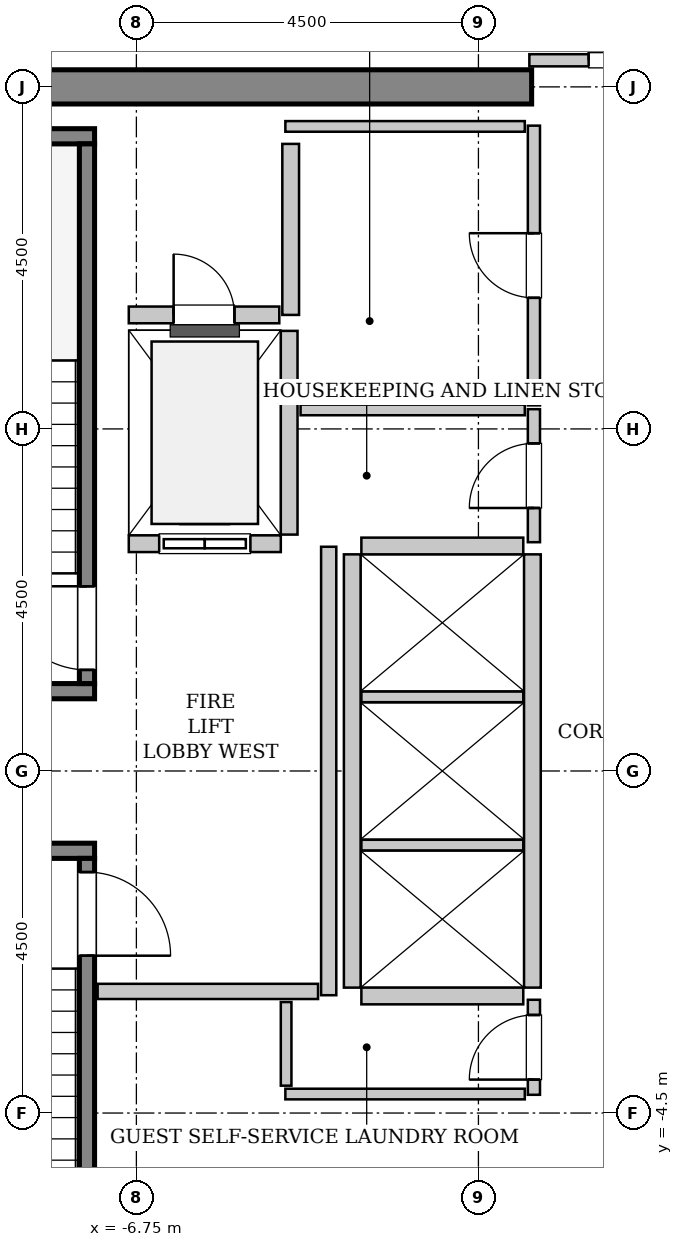
"""IFC4 building model, lengths in metres.
Left out: names, types, materials, properties, quantities, classifications, styles, units other than length and angle.
Written with IfcOpenShell. Run it as: python <this file> out.ifc"""

import sys

from ifc_helpers import new_model, si_unit, direction, frame, frame_2d, origin, place, context, subcontext, project, spatial, rectangle, extrude, source, transform, mapped, element, fill, save


model = new_model("IFC4")
c1 = context("Model", 3, precision=1e-05, world=origin(), true_north=direction((0.0, 1.0)))
c2 = subcontext(c1, "Body", "Model", "MODEL_VIEW")
j1 = project(units=[si_unit("LENGTHUNIT", "METRE"), si_unit("PLANEANGLEUNIT", "RADIAN")], contexts=[c1])
p1 = place(None, origin())
s1 = spatial("IfcSite", under=j1, at=p1, CompositionType="ELEMENT")
p2 = place(p1, origin())
s2 = spatial("IfcBuilding", under=s1, at=p2, CompositionType="ELEMENT")
p3 = place(p2, frame((0.0, 0.0, 248.4)))
s3 = spatial("IfcBuildingStorey", under=s2, at=p3, CompositionType="ELEMENT", Elevation=248.4)
m1 = source(origin(), c2, "Body", "SweptSolid", [
    extrude(rectangle(XDim=9.925, YDim=0.45, at=frame_2d((4.962, 0.0))), origin(), (0.0, 0.0, 1.0), 3.8),
])
p4 = place(p3, frame((-11.475, 9.0, 0.0), z_axis=(0.0, 0.0, 1.0), x_axis=(1.0, 0.0, 0.0)))
e1 = element("IfcWall", 1, at=p4, inside=s3, PredefinedType="SHEAR", context=c2, shape_type="MappedRepresentation", body=[
    mapped(m1, transform((0.0, 0.0, 0.0), x_axis=(1.0, 0.0, 0.0), y_axis=(0.0, 1.0, 0.0), z_axis=(0.0, 0.0, 1.0), scale=1.0)),
])
m2 = source(origin(), c2, "Body", "SweptSolid", [
    extrude(rectangle(XDim=3.4, YDim=0.2, at=frame_2d((1.7, 0.0))), origin(), (0.0, 0.0, 1.0), 3.8),
])
p5 = place(p3, frame((-7.3, 1.05, 0.0), z_axis=(0.0, 0.0, 1.0), x_axis=(-1.0, 0.0, 0.0)))
e2 = element("IfcWall", 2, at=p5, inside=s3, PredefinedType="SOLIDWALL", context=c2, shape_type="MappedRepresentation", body=[
    mapped(m2, transform((0.0, 0.0, 0.0), x_axis=(1.0, 0.0, 0.0), y_axis=(0.0, 1.0, 0.0), z_axis=(0.0, 0.0, 1.0), scale=1.0)),
])
m3 = source(origin(), c2, "Body", "SweptSolid", [
    extrude(rectangle(XDim=3.73, YDim=0.2, at=frame_2d((1.865, 0.0))), origin(), (0.0, 0.0, 1.0), 3.8),
])
p6 = place(p3, frame((-7.3, 8.35, 0.0), z_axis=(0.0, 0.0, 1.0), x_axis=(-1.0, 0.0, 0.0)))
e3 = element("IfcWall", 3, at=p6, inside=s3, PredefinedType="SOLIDWALL", context=c2, shape_type="MappedRepresentation", body=[
    mapped(m3, transform((0.0, 0.0, 0.0), x_axis=(1.0, 0.0, 0.0), y_axis=(0.0, 1.0, 0.0), z_axis=(0.0, 0.0, 1.0), scale=1.0)),
])
m4 = source(origin(), c2, "Body", "SweptSolid", [
    extrude(rectangle(XDim=7.1, YDim=0.2, at=frame_2d((3.55, 0.0))), origin(), (0.0, 0.0, 1.0), 3.8),
])
p7 = place(p3, frame((-7.4, 1.15, 0.0), z_axis=(0.0, 0.0, 1.0), x_axis=(0.0, 1.0, 0.0)))
e4 = element("IfcWall", 4, at=p7, inside=s3, PredefinedType="SOLIDWALL", context=c2, shape_type="MappedRepresentation", body=[
    mapped(m4, transform((0.0, 0.0, 0.0), x_axis=(1.0, 0.0, 0.0), y_axis=(0.0, 1.0, 0.0), z_axis=(0.0, 0.0, 1.0), scale=1.0)),
])
p8 = place(p7, frame((0.18, 0.0, 0.0)))
e5 = element("IfcOpeningElement", 5, at=p8, cuts=e4, PredefinedType="OPENING", context=c2, shape_type="SweptSolid", body=[
    extrude(rectangle(XDim=1.1, YDim=2.15, at=frame_2d((0.55, 1.075))), frame((0.0, 0.11, 0.0), z_axis=(0.0, -1.0, 0.0), x_axis=(1.0, 0.0, 0.0)), (0.0, 0.0, 1.0), 0.22),
])
p9 = place(p3, frame((-10.7, -1.05, 0.0), z_axis=(0.0, 0.0, 1.0), x_axis=(1.0, 0.0, 0.0)))
e6 = element("IfcWall", 6, at=p9, inside=s3, PredefinedType="SOLIDWALL", context=c2, shape_type="MappedRepresentation", body=[
    mapped(m2, transform((0.0, 0.0, 0.0), x_axis=(1.0, 0.0, 0.0), y_axis=(0.0, 1.0, 0.0), z_axis=(0.0, 0.0, 1.0), scale=1.0)),
])
p10 = place(p3, frame((-7.4, -1.15, 0.0), z_axis=(0.0, 0.0, 1.0), x_axis=(0.0, -1.0, 0.0)))
e7 = element("IfcWall", 7, at=p10, inside=s3, PredefinedType="SOLIDWALL", context=c2, shape_type="MappedRepresentation", body=[
    mapped(m4, transform((0.0, 0.0, 0.0), x_axis=(1.0, 0.0, 0.0), y_axis=(0.0, 1.0, 0.0), z_axis=(0.0, 0.0, 1.0), scale=1.0)),
])
p11 = place(p10, frame((0.18, 0.0, 0.0)))
e8 = element("IfcOpeningElement", 8, at=p11, cuts=e7, PredefinedType="OPENING", context=c2, shape_type="SweptSolid", body=[
    extrude(rectangle(XDim=1.1, YDim=2.15, at=frame_2d((0.55, 1.075))), frame((0.0, 0.11, 0.0), z_axis=(0.0, -1.0, 0.0), x_axis=(1.0, 0.0, 0.0)), (0.0, 0.0, 1.0), 0.22),
])
m5 = source(origin(), c2, "Body", "SweptSolid", [
    extrude(rectangle(XDim=2.0, YDim=0.22, at=frame_2d((1.0, 0.0))), origin(), (0.0, 0.0, 1.0), 3.535),
])
p12 = place(p3, frame((-6.85, 2.99, 0.0), z_axis=(0.0, 0.0, 1.0), x_axis=(1.0, 0.0, 0.0)))
e9 = element("IfcWall", 9, at=p12, inside=s3, PredefinedType="SOLIDWALL", context=c2, shape_type="MappedRepresentation", body=[
    mapped(m5, transform((0.0, 0.0, 0.0), x_axis=(1.0, 0.0, 0.0), y_axis=(0.0, 1.0, 0.0), z_axis=(0.0, 0.0, 1.0), scale=1.0)),
])
p13 = place(p12, frame((0.4, 0.0, 0.0)))
e10 = element("IfcOpeningElement", 10, at=p13, cuts=e9, PredefinedType="OPENING", context=c2, shape_type="SweptSolid", body=[
    extrude(rectangle(XDim=1.2, YDim=2.2, at=frame_2d((0.6, 1.1))), frame((0.0, 0.12, 0.0), z_axis=(0.0, -1.0, 0.0), x_axis=(1.0, 0.0, 0.0)), (0.0, 0.0, 1.0), 0.24),
])
m6 = source(origin(), c2, "Body", "SweptSolid", [
    extrude(rectangle(XDim=2.68, YDim=0.22, at=frame_2d((1.34, 0.0))), origin(), (0.0, 0.0, 1.0), 3.535),
])
p14 = place(p3, frame((-4.74, 3.11, 0.0), z_axis=(0.0, 0.0, 1.0), x_axis=(0.0, 1.0, 0.0)))
e11 = element("IfcWall", 11, at=p14, inside=s3, PredefinedType="SOLIDWALL", context=c2, shape_type="MappedRepresentation", body=[
    mapped(m6, transform((0.0, 0.0, 0.0), x_axis=(1.0, 0.0, 0.0), y_axis=(0.0, 1.0, 0.0), z_axis=(0.0, 0.0, 1.0), scale=1.0)),
])
m7 = source(origin(), c2, "Body", "SweptSolid", [
    extrude(rectangle(XDim=5.7, YDim=0.22, at=frame_2d((2.85, 0.0))), origin(), (0.0, 0.0, 1.0), 3.535),
])
for number, where, z_axis, x_axis in (
    (12, (-1.54, -2.85, 0.0), (0.0, 0.0, 1.0), (0.0, 1.0, 0.0)),
    (13, (-3.91, 2.85, 0.0), (0.0, 0.0, 1.0), (0.0, -1.0, 0.0)),
):
    element("IfcWall", number, at=place(p3, frame(where, z_axis=z_axis, x_axis=x_axis)), inside=s3, PredefinedType="SOLIDWALL", context=c2, shape_type="MappedRepresentation", body=[
        mapped(m7, transform((0.0, 0.0, 0.0), x_axis=(1.0, 0.0, 0.0), y_axis=(0.0, 1.0, 0.0), z_axis=(0.0, 0.0, 1.0), scale=1.0)),
    ])
m8 = source(origin(), c2, "Body", "SweptSolid", [
    extrude(rectangle(XDim=2.13, YDim=0.22, at=frame_2d((1.065, 0.0))), origin(), (0.0, 0.0, 1.0), 3.535),
])
p15 = place(p3, frame((-3.79, -2.96, 0.0), z_axis=(0.0, 0.0, 1.0), x_axis=(1.0, 0.0, 0.0)))
e14 = element("IfcWall", 14, at=p15, inside=s3, PredefinedType="SOLIDWALL", context=c2, shape_type="MappedRepresentation", body=[
    mapped(m8, transform((0.0, 0.0, 0.0), x_axis=(1.0, 0.0, 0.0), y_axis=(0.0, 1.0, 0.0), z_axis=(0.0, 0.0, 1.0), scale=1.0)),
])
m9 = source(origin(), c2, "Body", "SweptSolid", [
    extrude(rectangle(XDim=2.13, YDim=0.14, at=frame_2d((1.065, 0.0))), origin(), (0.0, 0.0, 1.0), 3.535),
])
for number, where, z_axis, x_axis in (
    (15, (-3.79, -0.975, 0.0), (0.0, 0.0, 1.0), (1.0, 0.0, 0.0)),
    (16, (-3.79, 0.975, 0.0), (0.0, 0.0, 1.0), (1.0, 0.0, 0.0)),
):
    element("IfcWall", number, at=place(p3, frame(where, z_axis=z_axis, x_axis=x_axis)), inside=s3, PredefinedType="PARTITIONING", context=c2, shape_type="MappedRepresentation", body=[
        mapped(m9, transform((0.0, 0.0, 0.0), x_axis=(1.0, 0.0, 0.0), y_axis=(0.0, 1.0, 0.0), z_axis=(0.0, 0.0, 1.0), scale=1.0)),
    ])
p16 = place(p3, frame((-1.66, 2.96, 0.0), z_axis=(0.0, 0.0, 1.0), x_axis=(-1.0, 0.0, 0.0)))
e17 = element("IfcWall", 17, at=p16, inside=s3, PredefinedType="SOLIDWALL", context=c2, shape_type="MappedRepresentation", body=[
    mapped(m8, transform((0.0, 0.0, 0.0), x_axis=(1.0, 0.0, 0.0), y_axis=(0.0, 1.0, 0.0), z_axis=(0.0, 0.0, 1.0), scale=1.0)),
])
m10 = source(origin(), c2, "Body", "SweptSolid", [
    extrude(rectangle(XDim=2.25, YDim=0.22, at=frame_2d((1.125, 0.0))), origin(), (0.0, 0.0, 1.0), 3.535),
])
p17 = place(p3, frame((-4.72, 6.0, 0.0), z_axis=(0.0, 0.0, 1.0), x_axis=(0.0, 1.0, 0.0)))
e18 = element("IfcWall", 18, at=p17, inside=s3, PredefinedType="SOLIDWALL", context=c2, shape_type="MappedRepresentation", body=[
    mapped(m10, transform((0.0, 0.0, 0.0), x_axis=(1.0, 0.0, 0.0), y_axis=(0.0, 1.0, 0.0), z_axis=(0.0, 0.0, 1.0), scale=1.0)),
])
m11 = source(origin(), c2, "Body", "SweptSolid", [
    extrude(rectangle(XDim=1.98, YDim=0.22, at=frame_2d((0.99, 0.0))), origin(), (0.0, 0.0, 1.0), 3.535),
])
p18 = place(p3, frame((-6.85, 6.0, 0.0), z_axis=(0.0, 0.0, 1.0), x_axis=(1.0, 0.0, 0.0)))
e19 = element("IfcWall", 19, at=p18, inside=s3, PredefinedType="SOLIDWALL", context=c2, shape_type="MappedRepresentation", body=[
    mapped(m11, transform((0.0, 0.0, 0.0), x_axis=(1.0, 0.0, 0.0), y_axis=(0.0, 1.0, 0.0), z_axis=(0.0, 0.0, 1.0), scale=1.0)),
])
p19 = place(p18, frame((0.59, 0.0, 0.0)))
e20 = element("IfcOpeningElement", 20, at=p19, cuts=e19, PredefinedType="OPENING", context=c2, shape_type="SweptSolid", body=[
    extrude(rectangle(XDim=0.8, YDim=2.0, at=frame_2d((0.4, 1.0))), frame((0.0, 0.12, 0.0), z_axis=(0.0, -1.0, 0.0), x_axis=(1.0, 0.0, 0.0)), (0.0, 0.0, 1.0), 0.24),
])
m12 = source(origin(), c2, "Body", "SweptSolid", [
    extrude(rectangle(XDim=5.9, YDim=0.2, at=frame_2d((2.95, 0.0))), origin(), (0.0, 0.0, 1.0), 3.535),
])
p20 = place(p3, frame((-4.22, -2.95, 0.0), z_axis=(0.0, 0.0, 1.0), x_axis=(0.0, 1.0, 0.0)))
e21 = element("IfcWall", 21, at=p20, inside=s3, PredefinedType="PARTITIONING", context=c2, shape_type="MappedRepresentation", body=[
    mapped(m12, transform((0.0, 0.0, 0.0), x_axis=(1.0, 0.0, 0.0), y_axis=(0.0, 1.0, 0.0), z_axis=(0.0, 0.0, 1.0), scale=1.0)),
])
m13 = source(origin(), c2, "Body", "SweptSolid", [
    extrude(rectangle(XDim=2.9, YDim=0.2, at=frame_2d((1.45, 0.0))), origin(), (0.0, 0.0, 1.0), 3.535),
])
p21 = place(p3, frame((-7.26, -2.9, 0.0), z_axis=(0.0, 0.0, 1.0), x_axis=(1.0, 0.0, 0.0)))
e22 = element("IfcWall", 22, at=p21, inside=s3, PredefinedType="PARTITIONING", context=c2, shape_type="MappedRepresentation", body=[
    mapped(m13, transform((0.0, 0.0, 0.0), x_axis=(1.0, 0.0, 0.0), y_axis=(0.0, 1.0, 0.0), z_axis=(0.0, 0.0, 1.0), scale=1.0)),
])
m14 = source(origin(), c2, "Body", "SweptSolid", [
    extrude(rectangle(XDim=3.16, YDim=0.16, at=frame_2d((1.58, 0.0))), origin(), (0.0, 0.0, 1.0), 2.625),
])
p22 = place(p3, frame((-1.58, 9.35, 0.0), z_axis=(0.0, 0.0, 1.0), x_axis=(1.0, 0.0, 0.0)))
e23 = element("IfcWall", 23, at=p22, inside=s3, PredefinedType="PARTITIONING", context=c2, shape_type="MappedRepresentation", body=[
    mapped(m14, transform((0.0, 0.0, 0.0), x_axis=(1.0, 0.0, 0.0), y_axis=(0.0, 1.0, 0.0), z_axis=(0.0, 0.0, 1.0), scale=1.0)),
])
p23 = place(p22, frame((0.78, 0.0, 0.0)))
e24 = element("IfcOpeningElement", 24, at=p23, cuts=e23, PredefinedType="OPENING", context=c2, shape_type="SweptSolid", body=[
    extrude(rectangle(XDim=1.6, YDim=2.3, at=frame_2d((0.8, 1.15))), frame((0.0, 0.09, 0.0), z_axis=(0.0, -1.0, 0.0), x_axis=(1.0, 0.0, 0.0)), (0.0, 0.0, 1.0), 0.18),
])
m15 = source(origin(), c2, "Body", "SweptSolid", [
    extrude(rectangle(XDim=1.75, YDim=0.16, at=frame_2d((0.875, 0.0))), origin(), (0.0, 0.0, 1.0), 3.535),
])
p24 = place(p3, frame((-1.52, 3.01, 0.0), z_axis=(0.0, 0.0, 1.0), x_axis=(0.0, 1.0, 0.0)))
e25 = element("IfcWall", 25, at=p24, inside=s3, PredefinedType="PARTITIONING", context=c2, shape_type="MappedRepresentation", body=[
    mapped(m15, transform((0.0, 0.0, 0.0), x_axis=(1.0, 0.0, 0.0), y_axis=(0.0, 1.0, 0.0), z_axis=(0.0, 0.0, 1.0), scale=1.0)),
])
p25 = place(p24, frame((0.45, 0.0, 0.0)))
e26 = element("IfcOpeningElement", 26, at=p25, cuts=e25, PredefinedType="OPENING", context=c2, shape_type="SweptSolid", body=[
    extrude(rectangle(XDim=0.85, YDim=2.1, at=frame_2d((0.425, 1.05))), frame((0.0, 0.09, 0.0), z_axis=(0.0, -1.0, 0.0), x_axis=(1.0, 0.0, 0.0)), (0.0, 0.0, 1.0), 0.18),
])
m16 = source(origin(), c2, "Body", "SweptSolid", [
    extrude(rectangle(XDim=2.95, YDim=0.14, at=frame_2d((1.475, 0.0))), origin(), (0.0, 0.0, 1.0), 3.535),
])
p26 = place(p3, frame((-4.59, 4.75, 0.0), z_axis=(0.0, 0.0, 1.0), x_axis=(1.0, 0.0, 0.0)))
e27 = element("IfcWall", 27, at=p26, inside=s3, PredefinedType="PARTITIONING", context=c2, shape_type="MappedRepresentation", body=[
    mapped(m16, transform((0.0, 0.0, 0.0), x_axis=(1.0, 0.0, 0.0), y_axis=(0.0, 1.0, 0.0), z_axis=(0.0, 0.0, 1.0), scale=1.0)),
])
m17 = source(origin(), c2, "Body", "SweptSolid", [
    extrude(rectangle(XDim=3.68, YDim=0.16, at=frame_2d((1.84, 0.0))), origin(), (0.0, 0.0, 1.0), 3.535),
])
p27 = place(p3, frame((-1.52, 4.81, 0.0), z_axis=(0.0, 0.0, 1.0), x_axis=(0.0, 1.0, 0.0)))
e28 = element("IfcWall", 28, at=p27, inside=s3, PredefinedType="PARTITIONING", context=c2, shape_type="MappedRepresentation", body=[
    mapped(m17, transform((0.0, 0.0, 0.0), x_axis=(1.0, 0.0, 0.0), y_axis=(0.0, 1.0, 0.0), z_axis=(0.0, 0.0, 1.0), scale=1.0)),
])
p28 = place(p27, frame((1.415, 0.0, 0.0)))
e29 = element("IfcOpeningElement", 29, at=p28, cuts=e28, PredefinedType="OPENING", context=c2, shape_type="SweptSolid", body=[
    extrude(rectangle(XDim=0.85, YDim=2.1, at=frame_2d((0.425, 1.05))), frame((0.0, 0.09, 0.0), z_axis=(0.0, -1.0, 0.0), x_axis=(1.0, 0.0, 0.0)), (0.0, 0.0, 1.0), 0.18),
])
m18 = source(origin(), c2, "Body", "SweptSolid", [
    extrude(rectangle(XDim=3.15, YDim=0.14, at=frame_2d((1.575, 0.0))), origin(), (0.0, 0.0, 1.0), 3.535),
])
p29 = place(p3, frame((-4.79, 8.48, 0.0), z_axis=(0.0, 0.0, 1.0), x_axis=(1.0, 0.0, 0.0)))
e30 = element("IfcWall", 30, at=p29, inside=s3, PredefinedType="PARTITIONING", context=c2, shape_type="MappedRepresentation", body=[
    mapped(m18, transform((0.0, 0.0, 0.0), x_axis=(1.0, 0.0, 0.0), y_axis=(0.0, 1.0, 0.0), z_axis=(0.0, 0.0, 1.0), scale=1.0)),
])
m19 = source(origin(), c2, "Body", "SweptSolid", [
    extrude(rectangle(XDim=1.25, YDim=0.16, at=frame_2d((0.625, 0.0))), origin(), (0.0, 0.0, 1.0), 3.535),
])
p30 = place(p3, frame((-1.52, -4.26, 0.0), z_axis=(0.0, 0.0, 1.0), x_axis=(0.0, 1.0, 0.0)))
e31 = element("IfcWall", 31, at=p30, inside=s3, PredefinedType="PARTITIONING", context=c2, shape_type="MappedRepresentation", body=[
    mapped(m19, transform((0.0, 0.0, 0.0), x_axis=(1.0, 0.0, 0.0), y_axis=(0.0, 1.0, 0.0), z_axis=(0.0, 0.0, 1.0), scale=1.0)),
])
p31 = place(p30, frame((0.2, 0.0, 0.0)))
e32 = element("IfcOpeningElement", 32, at=p31, cuts=e31, PredefinedType="OPENING", context=c2, shape_type="SweptSolid", body=[
    extrude(rectangle(XDim=0.85, YDim=2.1, at=frame_2d((0.425, 1.05))), frame((0.0, 0.09, 0.0), z_axis=(0.0, -1.0, 0.0), x_axis=(1.0, 0.0, 0.0)), (0.0, 0.0, 1.0), 0.18),
])
p32 = place(p3, frame((-4.79, -4.25, 0.0), z_axis=(0.0, 0.0, 1.0), x_axis=(1.0, 0.0, 0.0)))
e33 = element("IfcWall", 33, at=p32, inside=s3, PredefinedType="PARTITIONING", context=c2, shape_type="MappedRepresentation", body=[
    mapped(m18, transform((0.0, 0.0, 0.0), x_axis=(1.0, 0.0, 0.0), y_axis=(0.0, 1.0, 0.0), z_axis=(0.0, 0.0, 1.0), scale=1.0)),
])
m20 = source(origin(), c2, "Body", "SweptSolid", [
    extrude(rectangle(XDim=1.1, YDim=0.14, at=frame_2d((0.55, 0.0))), origin(), (0.0, 0.0, 1.0), 3.535),
])
p33 = place(p3, frame((-4.78, -4.14, 0.0), z_axis=(0.0, 0.0, 1.0), x_axis=(0.0, 1.0, 0.0)))
e34 = element("IfcWall", 34, at=p33, inside=s3, PredefinedType="PARTITIONING", context=c2, shape_type="MappedRepresentation", body=[
    mapped(m20, transform((0.0, 0.0, 0.0), x_axis=(1.0, 0.0, 0.0), y_axis=(0.0, 1.0, 0.0), z_axis=(0.0, 0.0, 1.0), scale=1.0)),
])
m21 = source(origin(), c2, "Body", "SweptSolid", [
    extrude(rectangle(XDim=1.1, YDim=2.15, at=frame_2d((0.55, 1.075))), frame((0.0, 0.025, 0.0), z_axis=(0.0, -1.0, 0.0), x_axis=(1.0, 0.0, 0.0)), (0.0, 0.0, 1.0), 0.05),
])
p34 = place(p8, origin())
e35 = element("IfcDoor", 35, at=p34, inside=s3, OperationType="SINGLE_SWING_RIGHT", PredefinedType="DOOR", context=c2, shape_type="MappedRepresentation", body=[
    mapped(m21, transform((0.0, 0.0, 0.0), x_axis=(1.0, 0.0, 0.0), y_axis=(0.0, 1.0, 0.0), z_axis=(0.0, 0.0, 1.0), scale=1.0)),
])
fill(e5, e35)
p35 = place(p11, origin())
e36 = element("IfcDoor", 36, at=p35, inside=s3, OperationType="SINGLE_SWING_RIGHT", PredefinedType="DOOR", context=c2, shape_type="MappedRepresentation", body=[
    mapped(m21, transform((0.0, 0.0, 0.0), x_axis=(1.0, 0.0, 0.0), y_axis=(0.0, 1.0, 0.0), z_axis=(0.0, 0.0, 1.0), scale=1.0)),
])
fill(e8, e36)
m22 = source(origin(), c2, "Body", "SweptSolid", [
    extrude(rectangle(XDim=1.2, YDim=2.2, at=frame_2d((0.6, 1.1))), frame((0.0, 0.025, 0.0), z_axis=(0.0, -1.0, 0.0), x_axis=(1.0, 0.0, 0.0)), (0.0, 0.0, 1.0), 0.05),
])
p36 = place(p13, origin())
e37 = element("IfcDoor", 37, at=p36, inside=s3, OperationType="SLIDING_TO_LEFT", PredefinedType="DOOR", context=c2, shape_type="MappedRepresentation", body=[
    mapped(m22, transform((0.0, 0.0, 0.0), x_axis=(1.0, 0.0, 0.0), y_axis=(0.0, 1.0, 0.0), z_axis=(0.0, 0.0, 1.0), scale=1.0)),
])
fill(e10, e37)
m23 = source(origin(), c2, "Body", "SweptSolid", [
    extrude(rectangle(XDim=0.8, YDim=2.0, at=frame_2d((0.4, 1.0))), frame((0.0, 0.025, 0.0), z_axis=(0.0, -1.0, 0.0), x_axis=(1.0, 0.0, 0.0)), (0.0, 0.0, 1.0), 0.05),
])
p37 = place(p19, origin())
e38 = element("IfcDoor", 38, at=p37, inside=s3, OperationType="SINGLE_SWING_LEFT", PredefinedType="TRAPDOOR", context=c2, shape_type="MappedRepresentation", body=[
    mapped(m23, transform((0.0, 0.0, 0.0), x_axis=(1.0, 0.0, 0.0), y_axis=(0.0, 1.0, 0.0), z_axis=(0.0, 0.0, 1.0), scale=1.0)),
])
fill(e20, e38)
m24 = source(origin(), c2, "Body", "SweptSolid", [
    extrude(rectangle(XDim=1.6, YDim=2.3, at=frame_2d((0.8, 1.15))), frame((0.0, 0.025, 0.0), z_axis=(0.0, -1.0, 0.0), x_axis=(1.0, 0.0, 0.0)), (0.0, 0.0, 1.0), 0.05),
])
p38 = place(p23, origin())
e39 = element("IfcDoor", 39, at=p38, inside=s3, OperationType="DOUBLE_DOOR_SINGLE_SWING", PredefinedType="DOOR", context=c2, shape_type="MappedRepresentation", body=[
    mapped(m24, transform((0.0, 0.0, 0.0), x_axis=(1.0, 0.0, 0.0), y_axis=(0.0, 1.0, 0.0), z_axis=(0.0, 0.0, 1.0), scale=1.0)),
])
fill(e24, e39)
m25 = source(origin(), c2, "Body", "SweptSolid", [
    extrude(rectangle(XDim=0.85, YDim=2.1, at=frame_2d((0.425, 1.05))), frame((0.0, 0.025, 0.0), z_axis=(0.0, -1.0, 0.0), x_axis=(1.0, 0.0, 0.0)), (0.0, 0.0, 1.0), 0.05),
])
p39 = place(p25, origin())
e40 = element("IfcDoor", 40, at=p39, inside=s3, OperationType="SINGLE_SWING_LEFT", PredefinedType="DOOR", context=c2, shape_type="MappedRepresentation", body=[
    mapped(m25, transform((0.0, 0.0, 0.0), x_axis=(1.0, 0.0, 0.0), y_axis=(0.0, 1.0, 0.0), z_axis=(0.0, 0.0, 1.0), scale=1.0)),
])
fill(e26, e40)
p40 = place(p28, origin())
e41 = element("IfcDoor", 41, at=p40, inside=s3, OperationType="SINGLE_SWING_RIGHT", PredefinedType="DOOR", context=c2, shape_type="MappedRepresentation", body=[
    mapped(m25, transform((0.0, 0.0, 0.0), x_axis=(1.0, 0.0, 0.0), y_axis=(0.0, 1.0, 0.0), z_axis=(0.0, 0.0, 1.0), scale=1.0)),
])
fill(e29, e41)
p41 = place(p31, origin())
e42 = element("IfcDoor", 42, at=p41, inside=s3, OperationType="SINGLE_SWING_LEFT", PredefinedType="DOOR", context=c2, shape_type="MappedRepresentation", body=[
    mapped(m25, transform((0.0, 0.0, 0.0), x_axis=(1.0, 0.0, 0.0), y_axis=(0.0, 1.0, 0.0), z_axis=(0.0, 0.0, 1.0), scale=1.0)),
])
fill(e32, e42)
save(model, sys.argv[1])
